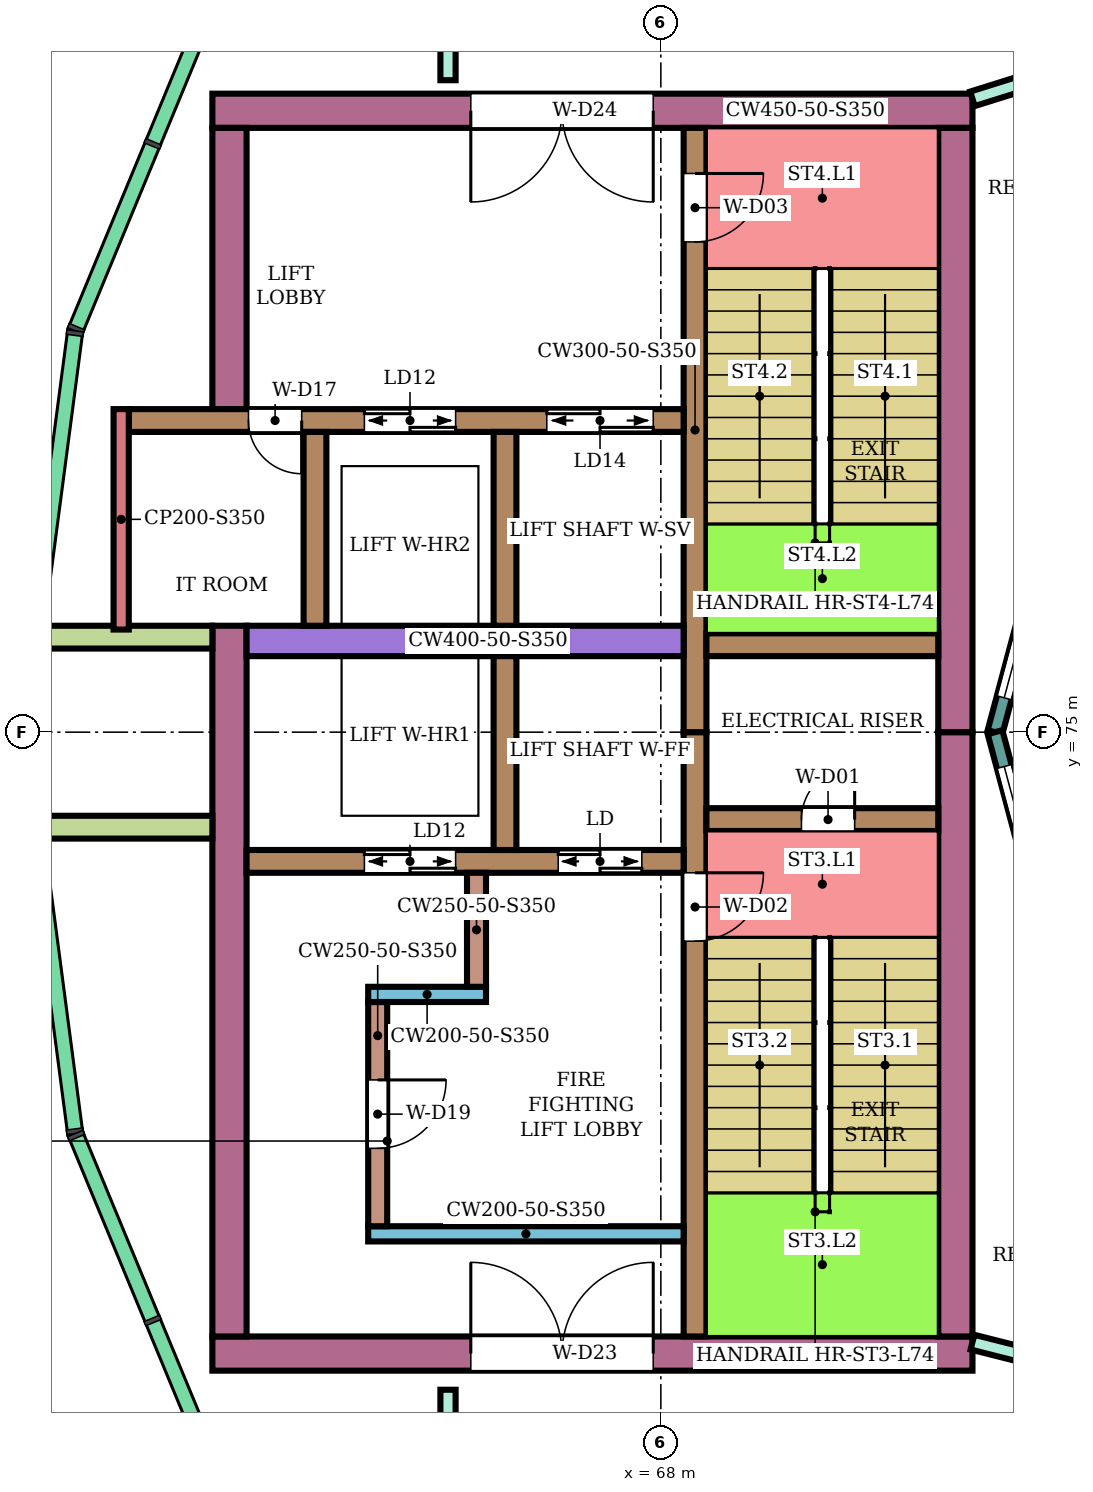
"""IFC4 building model, lengths in metres.
Left out: names, types, materials, properties, quantities, classifications, styles, units other than length and angle.
Written with IfcOpenShell. Run it as: python <this file> out.ifc"""

import sys

from ifc_helpers import new_model, si_unit, direction, frame, frame_2d, origin, place, context, subcontext, project, spatial, rectangle, extrude, element, fill, save


model = new_model("IFC4")
c1 = context("Model", 3, precision=1e-05, world=origin(), true_north=direction((0.0, 1.0)))
c2 = subcontext(c1, "Body", "Model", "MODEL_VIEW")
j1 = project(units=[si_unit("LENGTHUNIT", "METRE"), si_unit("PLANEANGLEUNIT", "RADIAN")], contexts=[c1])
p1 = place(None, origin())
s1 = spatial("IfcSite", under=j1, at=p1, CompositionType="ELEMENT")
p2 = place(p1, origin())
s2 = spatial("IfcBuilding", under=s1, at=p2, CompositionType="ELEMENT")
p3 = place(p2, frame((0.0, 0.0, 323.7)))
s3 = spatial("IfcBuildingStorey", under=s2, at=p3, CompositionType="ELEMENT", Elevation=323.7)
p4 = place(p3, frame((72.1, 66.825, 0.0), z_axis=(0.0, 0.0, 1.0), x_axis=(-1.0, 0.0, 0.0)))
e1 = element("IfcWall", 1, at=p4, inside=s3, PredefinedType="SHEAR", context=c2, shape_type="SweptSolid", body=[
    extrude(rectangle(XDim=10.0, YDim=0.45, at=frame_2d((5.0, 0.0))), origin(), (0.0, 0.0, 1.0), 4.05),
])
p5 = place(p4, frame((4.2, 0.0, 0.0)))
e2 = element("IfcOpeningElement", 2, at=p5, cuts=e1, PredefinedType="OPENING", context=c2, shape_type="SweptSolid", body=[
    extrude(rectangle(XDim=2.4, YDim=2.4, at=frame_2d((1.2, 1.2))), frame((0.0, 0.235, 0.0), z_axis=(0.0, -1.0, 0.0), x_axis=(1.0, 0.0, 0.0)), (0.0, 0.0, 1.0), 0.47),
])
p6 = place(p3, frame((72.1, 83.175, 0.0), z_axis=(0.0, 0.0, 1.0), x_axis=(-1.0, 0.0, 0.0)))
e3 = element("IfcWall", 3, at=p6, inside=s3, PredefinedType="SHEAR", context=c2, shape_type="SweptSolid", body=[
    extrude(rectangle(XDim=10.0, YDim=0.45, at=frame_2d((5.0, 0.0))), origin(), (0.0, 0.0, 1.0), 4.05),
])
p7 = place(p6, frame((4.2, 0.0, 0.0)))
e4 = element("IfcOpeningElement", 4, at=p7, cuts=e3, PredefinedType="OPENING", context=c2, shape_type="SweptSolid", body=[
    extrude(rectangle(XDim=2.4, YDim=2.4, at=frame_2d((1.2, 1.2))), frame((0.0, 0.235, 0.0), z_axis=(0.0, -1.0, 0.0), x_axis=(1.0, 0.0, 0.0)), (0.0, 0.0, 1.0), 0.47),
])
for number, where, z_axis, x_axis in (
    (5, (71.875, 75.0, 0.0), (0.0, 0.0, 1.0), (0.0, -1.0, 0.0)),
    (6, (71.875, 82.95, 0.0), (0.0, 0.0, 1.0), (0.0, -1.0, 0.0)),
):
    element("IfcWall", number, at=place(p3, frame(where, z_axis=z_axis, x_axis=x_axis)), inside=s3, PredefinedType="SHEAR", context=c2, shape_type="SweptSolid", body=[
        extrude(rectangle(XDim=7.95, YDim=0.45, at=frame_2d((3.975, 0.0))), origin(), (0.0, 0.0, 1.0), 4.05),
    ])
p8 = place(p3, frame((62.325, 76.4, 0.0), z_axis=(0.0, 0.0, 1.0), x_axis=(0.0, -1.0, 0.0)))
e7 = element("IfcWall", 7, at=p8, inside=s3, PredefinedType="SHEAR", context=c2, shape_type="SweptSolid", body=[
    extrude(rectangle(XDim=9.35, YDim=0.45, at=frame_2d((4.675, 0.0))), origin(), (0.0, 0.0, 1.0), 4.05),
])
p9 = place(p3, frame((62.325, 82.95, 0.0), z_axis=(0.0, 0.0, 1.0), x_axis=(0.0, -1.0, 0.0)))
e8 = element("IfcWall", 8, at=p9, inside=s3, PredefinedType="SHEAR", context=c2, shape_type="SweptSolid", body=[
    extrude(rectangle(XDim=3.7, YDim=0.45, at=frame_2d((1.85, 0.0))), origin(), (0.0, 0.0, 1.0), 4.05),
])
p10 = place(p3, frame((68.45, 75.0, 0.0), z_axis=(0.0, 0.0, 1.0), x_axis=(0.0, -1.0, 0.0)))
e9 = element("IfcWall", 9, at=p10, inside=s3, PredefinedType="SHEAR", context=c2, shape_type="SweptSolid", body=[
    extrude(rectangle(XDim=7.95, YDim=0.3, at=frame_2d((3.975, 0.0))), origin(), (0.0, 0.0, 1.0), 4.05),
])
p11 = place(p10, frame((1.85, 0.0, 0.0)))
e10 = element("IfcOpeningElement", 10, at=p11, cuts=e9, PredefinedType="OPENING", context=c2, shape_type="SweptSolid", body=[
    extrude(rectangle(XDim=0.9, YDim=2.1, at=frame_2d((0.45, 1.05))), frame((0.0, 0.16, 0.0), z_axis=(0.0, -1.0, 0.0), x_axis=(1.0, 0.0, 0.0)), (0.0, 0.0, 1.0), 0.32),
])
p12 = place(p3, frame((68.45, 82.95, 0.0), z_axis=(0.0, 0.0, 1.0), x_axis=(0.0, -1.0, 0.0)))
e11 = element("IfcWall", 11, at=p12, inside=s3, PredefinedType="SHEAR", context=c2, shape_type="SweptSolid", body=[
    extrude(rectangle(XDim=7.95, YDim=0.3, at=frame_2d((3.975, 0.0))), origin(), (0.0, 0.0, 1.0), 4.05),
])
p13 = place(p12, frame((0.6, 0.0, 0.0)))
e12 = element("IfcOpeningElement", 12, at=p13, cuts=e11, PredefinedType="OPENING", context=c2, shape_type="SweptSolid", body=[
    extrude(rectangle(XDim=0.9, YDim=2.1, at=frame_2d((0.45, 1.05))), frame((0.0, 0.16, 0.0), z_axis=(0.0, -1.0, 0.0), x_axis=(1.0, 0.0, 0.0)), (0.0, 0.0, 1.0), 0.32),
])
p14 = place(p3, frame((71.65, 73.85, 0.0), z_axis=(0.0, 0.0, 1.0), x_axis=(-1.0, 0.0, 0.0)))
e13 = element("IfcWall", 13, at=p14, inside=s3, PredefinedType="SHEAR", context=c2, shape_type="SweptSolid", body=[
    extrude(rectangle(XDim=3.05, YDim=0.3, at=frame_2d((1.525, 0.0))), origin(), (0.0, 0.0, 1.0), 4.05),
])
p15 = place(p14, frame((1.1, 0.0, 0.0)))
e14 = element("IfcOpeningElement", 14, at=p15, cuts=e13, PredefinedType="OPENING", context=c2, shape_type="SweptSolid", body=[
    extrude(rectangle(XDim=0.7, YDim=2.0, at=frame_2d((0.35, 1.0))), frame((0.0, 0.16, 0.0), z_axis=(0.0, -1.0, 0.0), x_axis=(1.0, 0.0, 0.0)), (0.0, 0.0, 1.0), 0.32),
])
p16 = place(p3, frame((71.65, 76.15, 0.0), z_axis=(0.0, 0.0, 1.0), x_axis=(-1.0, 0.0, 0.0)))
e15 = element("IfcWall", 15, at=p16, inside=s3, PredefinedType="SHEAR", context=c2, shape_type="SweptSolid", body=[
    extrude(rectangle(XDim=3.05, YDim=0.3, at=frame_2d((1.525, 0.0))), origin(), (0.0, 0.0, 1.0), 4.05),
])
p17 = place(p3, frame((68.3, 73.3, 0.0), z_axis=(0.0, 0.0, 1.0), x_axis=(-1.0, 0.0, 0.0)))
e16 = element("IfcWall", 16, at=p17, inside=s3, PredefinedType="SHEAR", context=c2, shape_type="SweptSolid", body=[
    extrude(rectangle(XDim=5.75, YDim=0.3, at=frame_2d((2.875, 0.0))), origin(), (0.0, 0.0, 1.0), 4.05),
])
p18 = place(p17, frame((0.55, 0.0, 0.0)))
e17 = element("IfcOpeningElement", 17, at=p18, cuts=e16, PredefinedType="OPENING", context=c2, shape_type="SweptSolid", body=[
    extrude(rectangle(XDim=1.1, YDim=2.1, at=frame_2d((0.55, 1.05))), frame((0.0, 0.16, 0.0), z_axis=(0.0, -1.0, 0.0), x_axis=(1.0, 0.0, 0.0)), (0.0, 0.0, 1.0), 0.32),
])
p19 = place(p17, frame((3.0, 0.0, 0.0)))
e18 = element("IfcOpeningElement", 18, at=p19, cuts=e16, PredefinedType="OPENING", context=c2, shape_type="SweptSolid", body=[
    extrude(rectangle(XDim=1.2, YDim=2.1, at=frame_2d((0.6, 1.05))), frame((0.0, 0.16, 0.0), z_axis=(0.0, -1.0, 0.0), x_axis=(1.0, 0.0, 0.0)), (0.0, 0.0, 1.0), 0.32),
])
p20 = place(p3, frame((68.3, 76.2, 0.0), z_axis=(0.0, 0.0, 1.0), x_axis=(-1.0, 0.0, 0.0)))
e19 = element("IfcWall", 19, at=p20, inside=s3, PredefinedType="SHEAR", context=c2, shape_type="SweptSolid", body=[
    extrude(rectangle(XDim=5.75, YDim=0.4, at=frame_2d((2.875, 0.0))), origin(), (0.0, 0.0, 1.0), 4.05),
])
p21 = place(p3, frame((68.3, 79.1, 0.0), z_axis=(0.0, 0.0, 1.0), x_axis=(-1.0, 0.0, 0.0)))
e20 = element("IfcWall", 20, at=p21, inside=s3, PredefinedType="SHEAR", context=c2, shape_type="SweptSolid", body=[
    extrude(rectangle(XDim=7.3, YDim=0.3, at=frame_2d((3.65, 0.0))), origin(), (0.0, 0.0, 1.0), 4.05),
])
p22 = place(p21, frame((0.4, 0.0, 0.0)))
e21 = element("IfcOpeningElement", 21, at=p22, cuts=e20, PredefinedType="OPENING", context=c2, shape_type="SweptSolid", body=[
    extrude(rectangle(XDim=1.4, YDim=2.1, at=frame_2d((0.7, 1.05))), frame((0.0, 0.16, 0.0), z_axis=(0.0, -1.0, 0.0), x_axis=(1.0, 0.0, 0.0)), (0.0, 0.0, 1.0), 0.32),
])
p23 = place(p21, frame((3.0, 0.0, 0.0)))
e22 = element("IfcOpeningElement", 22, at=p23, cuts=e20, PredefinedType="OPENING", context=c2, shape_type="SweptSolid", body=[
    extrude(rectangle(XDim=1.2, YDim=2.1, at=frame_2d((0.6, 1.05))), frame((0.0, 0.16, 0.0), z_axis=(0.0, -1.0, 0.0), x_axis=(1.0, 0.0, 0.0)), (0.0, 0.0, 1.0), 0.32),
])
p24 = place(p21, frame((5.025, 0.0, 0.0)))
e23 = element("IfcOpeningElement", 23, at=p24, cuts=e20, PredefinedType="OPENING", context=c2, shape_type="SweptSolid", body=[
    extrude(rectangle(XDim=0.7, YDim=2.1, at=frame_2d((0.35, 1.05))), frame((0.0, 0.16, 0.0), z_axis=(0.0, -1.0, 0.0), x_axis=(1.0, 0.0, 0.0)), (0.0, 0.0, 1.0), 0.32),
])
for number, where, z_axis, x_axis in (
    (24, (65.95, 76.0, 0.0), (0.0, 0.0, 1.0), (0.0, -1.0, 0.0)),
    (25, (65.95, 78.95, 0.0), (0.0, 0.0, 1.0), (0.0, -1.0, 0.0)),
    (26, (63.45, 78.95, 0.0), (0.0, 0.0, 1.0), (0.0, -1.0, 0.0)),
):
    element("IfcWall", number, at=place(p3, frame(where, z_axis=z_axis, x_axis=x_axis)), inside=s3, PredefinedType="SHEAR", context=c2, shape_type="SweptSolid", body=[
        extrude(rectangle(XDim=2.55, YDim=0.3, at=frame_2d((1.275, 0.0))), origin(), (0.0, 0.0, 1.0), 4.05),
    ])
p25 = place(p3, frame((68.3, 68.4, 0.0), z_axis=(0.0, 0.0, 1.0), x_axis=(-1.0, 0.0, 0.0)))
e27 = element("IfcWall", 27, at=p25, inside=s3, PredefinedType="SHEAR", context=c2, shape_type="SweptSolid", body=[
    extrude(rectangle(XDim=4.15, YDim=0.2, at=frame_2d((2.075, 0.0))), origin(), (0.0, 0.0, 1.0), 4.05),
])
p26 = place(p3, frame((64.275, 71.45, 0.0), z_axis=(0.0, 0.0, 1.0), x_axis=(0.0, -1.0, 0.0)))
e28 = element("IfcWall", 28, at=p26, inside=s3, PredefinedType="SHEAR", context=c2, shape_type="SweptSolid", body=[
    extrude(rectangle(XDim=2.95, YDim=0.25, at=frame_2d((1.475, 0.0))), origin(), (0.0, 0.0, 1.0), 4.05),
])
p27 = place(p26, frame((1.025, 0.0, 0.0)))
e29 = element("IfcOpeningElement", 29, at=p27, cuts=e28, PredefinedType="OPENING", context=c2, shape_type="SweptSolid", body=[
    extrude(rectangle(XDim=0.9, YDim=2.1, at=frame_2d((0.45, 1.05))), frame((0.0, 0.135, 0.0), z_axis=(0.0, -1.0, 0.0), x_axis=(1.0, 0.0, 0.0)), (0.0, 0.0, 1.0), 0.27),
])
p28 = place(p3, frame((65.7, 71.55, 0.0), z_axis=(0.0, 0.0, 1.0), x_axis=(-1.0, 0.0, 0.0)))
e30 = element("IfcWall", 30, at=p28, inside=s3, PredefinedType="SHEAR", context=c2, shape_type="SweptSolid", body=[
    extrude(rectangle(XDim=1.55, YDim=0.2, at=frame_2d((0.775, 0.0))), origin(), (0.0, 0.0, 1.0), 4.05),
])
p29 = place(p3, frame((65.575, 73.15, 0.0), z_axis=(0.0, 0.0, 1.0), x_axis=(0.0, -1.0, 0.0)))
e31 = element("IfcWall", 31, at=p29, inside=s3, PredefinedType="SHEAR", context=c2, shape_type="SweptSolid", body=[
    extrude(rectangle(XDim=1.5, YDim=0.25, at=frame_2d((0.75, 0.0))), origin(), (0.0, 0.0, 1.0), 4.05),
])
for number, where, z_axis, x_axis in (
    (32, (62.1, 76.25, 0.0), (0.0, 0.0, 1.0), (-1.0, 0.0, 0.0)),
    (33, (62.1, 73.75, 0.0), (0.0, 0.0, 1.0), (-1.0, 0.0, 0.0)),
):
    element("IfcWall", number, at=place(p3, frame(where, z_axis=z_axis, x_axis=x_axis)), inside=s3, PredefinedType="NOTDEFINED", context=c2, shape_type="SweptSolid", body=[
        extrude(rectangle(XDim=2.416, YDim=0.3, at=frame_2d((1.208, 0.0))), origin(), (0.0, 0.0, 1.0), 4.4),
    ])
p30 = place(p3, frame((73.415, 78.802, 0.0), z_axis=(0.0, 0.0, 1.0), x_axis=(-0.258789828301, -0.965933654434, 0.0)))
e34 = element("IfcWall", 34, at=p30, inside=s3, PredefinedType="NOTDEFINED", context=c2, shape_type="SweptSolid", body=[
    extrude(rectangle(XDim=3.936, YDim=0.2, at=frame_2d((1.968, 0.0))), origin(), (0.0, 0.0, 1.0), 4.4),
])
p31 = place(p30, frame((0.468, 0.0, 0.9)))
e35 = element("IfcOpeningElement", 35, at=p31, cuts=e34, PredefinedType="OPENING", context=c2, shape_type="SweptSolid", body=[
    extrude(rectangle(XDim=3.0, YDim=2.3, at=frame_2d((1.5, 1.15))), frame((0.0, 0.11, 0.0), z_axis=(0.0, -1.0, 0.0), x_axis=(1.0, 0.0, 0.0)), (0.0, 0.0, 1.0), 0.22),
])
p32 = place(p3, frame((72.396, 75.0, 0.0), z_axis=(0.0, 0.0, 1.0), x_axis=(0.258789828301, -0.965933654434, 0.0)))
e36 = element("IfcWall", 36, at=p32, inside=s3, PredefinedType="NOTDEFINED", context=c2, shape_type="SweptSolid", body=[
    extrude(rectangle(XDim=3.936, YDim=0.2, at=frame_2d((1.968, 0.0))), origin(), (0.0, 0.0, 1.0), 4.4),
])
p33 = place(p32, frame((0.468, 0.0, 0.9)))
e37 = element("IfcOpeningElement", 37, at=p33, cuts=e36, PredefinedType="OPENING", context=c2, shape_type="SweptSolid", body=[
    extrude(rectangle(XDim=3.0, YDim=2.3, at=frame_2d((1.5, 1.15))), frame((0.0, 0.11, 0.0), z_axis=(0.0, -1.0, 0.0), x_axis=(1.0, 0.0, 0.0)), (0.0, 0.0, 1.0), 0.22),
])
p34 = place(p3, frame((65.2, 65.2, 0.0), z_axis=(0.0, 0.0, 1.0), x_axis=(0.0, 1.0, 0.0)))
e38 = element("IfcWall", 38, at=p34, inside=s3, PredefinedType="PARTITIONING", context=c2, shape_type="SweptSolid", body=[
    extrude(rectangle(XDim=1.149, YDim=0.2, at=frame_2d((0.575, 0.0))), origin(), (0.0, 0.0, 1.0), 3.95),
])
p35 = place(p3, frame((65.2, 83.577, 0.0), z_axis=(0.0, 0.0, 1.0), x_axis=(0.0, 1.0, 0.0)))
e39 = element("IfcWall", 39, at=p35, inside=s3, PredefinedType="PARTITIONING", context=c2, shape_type="SweptSolid", body=[
    extrude(rectangle(XDim=1.223, YDim=0.2, at=frame_2d((0.612, 0.0))), origin(), (0.0, 0.0, 1.0), 3.95),
])
p36 = place(p3, frame((72.1, 66.975, 0.0), z_axis=(0.0, 0.0, 1.0), x_axis=(0.969471314457, -0.245204752086, 0.0)))
e40 = element("IfcWall", 40, at=p36, inside=s3, PredefinedType="PARTITIONING", context=c2, shape_type="SweptSolid", body=[
    extrude(rectangle(XDim=2.582, YDim=0.2, at=frame_2d((1.291, 0.0))), origin(), (0.0, 0.0, 1.0), 3.95),
])
p37 = place(p36, frame((0.841, 0.0, 0.0)))
e41 = element("IfcOpeningElement", 41, at=p37, cuts=e40, PredefinedType="OPENING", context=c2, shape_type="SweptSolid", body=[
    extrude(rectangle(XDim=0.9, YDim=2.1, at=frame_2d((0.45, 1.05))), frame((0.0, 0.11, 0.0), z_axis=(0.0, -1.0, 0.0), x_axis=(1.0, 0.0, 0.0)), (0.0, 0.0, 1.0), 0.22),
])
p38 = place(p3, frame((72.1, 83.332, 0.0), z_axis=(0.0, 0.0, 1.0), x_axis=(0.954233106619, 0.299063836383, 0.0)))
e42 = element("IfcWall", 42, at=p38, inside=s3, PredefinedType="PARTITIONING", context=c2, shape_type="SweptSolid", body=[
    extrude(rectangle(XDim=2.414, YDim=0.2, at=frame_2d((1.207, 0.0))), origin(), (0.0, 0.0, 1.0), 3.95),
])
p39 = place(p38, frame((0.762, 0.0, 0.0)))
e43 = element("IfcOpeningElement", 43, at=p39, cuts=e42, PredefinedType="OPENING", context=c2, shape_type="SweptSolid", body=[
    extrude(rectangle(XDim=0.9, YDim=2.1, at=frame_2d((0.45, 1.05))), frame((0.0, 0.11, 0.0), z_axis=(0.0, -1.0, 0.0), x_axis=(1.0, 0.0, 0.0)), (0.0, 0.0, 1.0), 0.22),
])
p40 = place(p3, frame((60.9, 79.25, 0.0), z_axis=(0.0, 0.0, 1.0), x_axis=(0.0, -1.0, 0.0)))
e44 = element("IfcWall", 44, at=p40, inside=s3, PredefinedType="PARTITIONING", context=c2, shape_type="SweptSolid", body=[
    extrude(rectangle(XDim=2.9, YDim=0.2, at=frame_2d((1.45, 0.0))), origin(), (0.0, 0.0, 1.0), 4.05),
])
p41 = place(p31, origin())
e45 = element("IfcWindow", 45, at=p41, inside=s3, PartitioningType="SINGLE_PANEL", PredefinedType="WINDOW", context=c2, shape_type="SweptSolid", body=[
    extrude(rectangle(XDim=3.0, YDim=2.3, at=frame_2d((1.5, 1.15))), frame((0.0, 0.03, 0.0), z_axis=(0.0, -1.0, 0.0), x_axis=(1.0, 0.0, 0.0)), (0.0, 0.0, 1.0), 0.06),
])
fill(e35, e45)
p42 = place(p33, origin())
e46 = element("IfcWindow", 46, at=p42, inside=s3, PartitioningType="SINGLE_PANEL", PredefinedType="WINDOW", context=c2, shape_type="SweptSolid", body=[
    extrude(rectangle(XDim=3.0, YDim=2.3, at=frame_2d((1.5, 1.15))), frame((0.0, 0.03, 0.0), z_axis=(0.0, -1.0, 0.0), x_axis=(1.0, 0.0, 0.0)), (0.0, 0.0, 1.0), 0.06),
])
fill(e37, e46)
p43 = place(p15, frame((0.7, 0.0, 0.0), z_axis=(0.0, 0.0, 1.0), x_axis=(-1.0, 0.0, 0.0)))
e47 = element("IfcDoor", 47, at=p43, inside=s3, OperationType="SINGLE_SWING_RIGHT", PredefinedType="DOOR", context=c2, shape_type="SweptSolid", body=[
    extrude(rectangle(XDim=0.7, YDim=2.0, at=frame_2d((0.35, 1.0))), frame((0.0, 0.025, 0.0), z_axis=(0.0, -1.0, 0.0), x_axis=(1.0, 0.0, 0.0)), (0.0, 0.0, 1.0), 0.05),
])
fill(e14, e47)
p44 = place(p11, origin())
e48 = element("IfcDoor", 48, at=p44, inside=s3, OperationType="SINGLE_SWING_LEFT", PredefinedType="DOOR", context=c2, shape_type="SweptSolid", body=[
    extrude(rectangle(XDim=0.9, YDim=2.1, at=frame_2d((0.45, 1.05))), frame((0.0, 0.025, 0.0), z_axis=(0.0, -1.0, 0.0), x_axis=(1.0, 0.0, 0.0)), (0.0, 0.0, 1.0), 0.05),
])
fill(e10, e48)
p45 = place(p13, origin())
e49 = element("IfcDoor", 49, at=p45, inside=s3, OperationType="SINGLE_SWING_LEFT", PredefinedType="DOOR", context=c2, shape_type="SweptSolid", body=[
    extrude(rectangle(XDim=0.9, YDim=2.1, at=frame_2d((0.45, 1.05))), frame((0.0, 0.025, 0.0), z_axis=(0.0, -1.0, 0.0), x_axis=(1.0, 0.0, 0.0)), (0.0, 0.0, 1.0), 0.05),
])
fill(e12, e49)
p46 = place(p18, origin())
e50 = element("IfcDoor", 50, at=p46, inside=s3, OperationType="DOUBLE_DOOR_SLIDING", PredefinedType="DOOR", context=c2, shape_type="SweptSolid", body=[
    extrude(rectangle(XDim=1.1, YDim=2.1, at=frame_2d((0.55, 1.05))), frame((0.0, 0.025, 0.0), z_axis=(0.0, -1.0, 0.0), x_axis=(1.0, 0.0, 0.0)), (0.0, 0.0, 1.0), 0.05),
])
fill(e17, e50)
p47 = place(p19, origin())
e51 = element("IfcDoor", 51, at=p47, inside=s3, OperationType="DOUBLE_DOOR_SLIDING", PredefinedType="DOOR", context=c2, shape_type="SweptSolid", body=[
    extrude(rectangle(XDim=1.2, YDim=2.1, at=frame_2d((0.6, 1.05))), frame((0.0, 0.025, 0.0), z_axis=(0.0, -1.0, 0.0), x_axis=(1.0, 0.0, 0.0)), (0.0, 0.0, 1.0), 0.05),
])
fill(e18, e51)
p48 = place(p22, origin())
e52 = element("IfcDoor", 52, at=p48, inside=s3, OperationType="DOUBLE_DOOR_SLIDING", PredefinedType="DOOR", context=c2, shape_type="SweptSolid", body=[
    extrude(rectangle(XDim=1.4, YDim=2.1, at=frame_2d((0.7, 1.05))), frame((0.0, 0.025, 0.0), z_axis=(0.0, -1.0, 0.0), x_axis=(1.0, 0.0, 0.0)), (0.0, 0.0, 1.0), 0.05),
])
fill(e21, e52)
p49 = place(p23, origin())
e53 = element("IfcDoor", 53, at=p49, inside=s3, OperationType="DOUBLE_DOOR_SLIDING", PredefinedType="DOOR", context=c2, shape_type="SweptSolid", body=[
    extrude(rectangle(XDim=1.2, YDim=2.1, at=frame_2d((0.6, 1.05))), frame((0.0, 0.025, 0.0), z_axis=(0.0, -1.0, 0.0), x_axis=(1.0, 0.0, 0.0)), (0.0, 0.0, 1.0), 0.05),
])
fill(e22, e53)
p50 = place(p24, origin())
e54 = element("IfcDoor", 54, at=p50, inside=s3, OperationType="SINGLE_SWING_LEFT", PredefinedType="DOOR", context=c2, shape_type="SweptSolid", body=[
    extrude(rectangle(XDim=0.7, YDim=2.1, at=frame_2d((0.35, 1.05))), frame((0.0, 0.025, 0.0), z_axis=(0.0, -1.0, 0.0), x_axis=(1.0, 0.0, 0.0)), (0.0, 0.0, 1.0), 0.05),
])
fill(e23, e54)
p51 = place(p27, origin())
e55 = element("IfcDoor", 55, at=p51, inside=s3, OperationType="SINGLE_SWING_LEFT", PredefinedType="DOOR", context=c2, shape_type="SweptSolid", body=[
    extrude(rectangle(XDim=0.9, YDim=2.1, at=frame_2d((0.45, 1.05))), frame((0.0, 0.025, 0.0), z_axis=(0.0, -1.0, 0.0), x_axis=(1.0, 0.0, 0.0)), (0.0, 0.0, 1.0), 0.05),
])
fill(e29, e55)
p52 = place(p5, frame((2.4, 0.0, 0.0), z_axis=(0.0, 0.0, 1.0), x_axis=(-1.0, 0.0, 0.0)))
e56 = element("IfcDoor", 56, at=p52, inside=s3, OperationType="DOUBLE_DOOR_SINGLE_SWING", PredefinedType="DOOR", context=c2, shape_type="SweptSolid", body=[
    extrude(rectangle(XDim=2.4, YDim=2.4, at=frame_2d((1.2, 1.2))), frame((0.0, 0.025, 0.0), z_axis=(0.0, -1.0, 0.0), x_axis=(1.0, 0.0, 0.0)), (0.0, 0.0, 1.0), 0.05),
])
fill(e2, e56)
p53 = place(p7, origin())
e57 = element("IfcDoor", 57, at=p53, inside=s3, OperationType="DOUBLE_DOOR_SINGLE_SWING", PredefinedType="DOOR", context=c2, shape_type="SweptSolid", body=[
    extrude(rectangle(XDim=2.4, YDim=2.4, at=frame_2d((1.2, 1.2))), frame((0.0, 0.025, 0.0), z_axis=(0.0, -1.0, 0.0), x_axis=(1.0, 0.0, 0.0)), (0.0, 0.0, 1.0), 0.05),
])
fill(e4, e57)
save(model, sys.argv[1])
